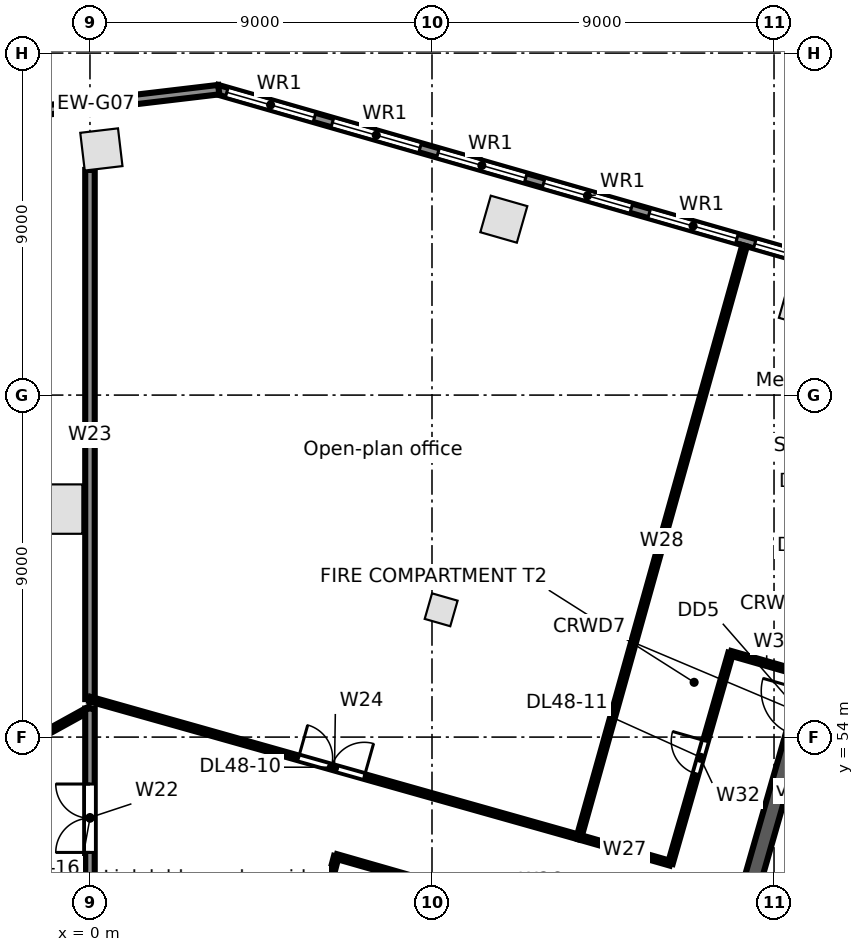
"""IFC4 building model, lengths in metres.
Left out: names, types, materials, properties, quantities, classifications, styles, units other than length and angle.
Written with IfcOpenShell. Run it as: python <this file> out.ifc"""

import sys

from ifc_helpers import new_model, si_unit, direction, frame, frame_2d, origin, origin_2d, place, context, subcontext, project, spatial, rectangle, extrude, element, fill, save


model = new_model("IFC4")
c1 = context("Model", 3, precision=1e-05, world=origin(), true_north=direction((0.0, 1.0)))
c2 = subcontext(c1, "Body", "Model", "MODEL_VIEW")
j1 = project(units=[si_unit("LENGTHUNIT", "METRE"), si_unit("PLANEANGLEUNIT", "RADIAN")], contexts=[c1])
p1 = place(None, origin())
s1 = spatial("IfcSite", under=j1, at=p1, CompositionType="ELEMENT")
p2 = place(p1, origin())
s2 = spatial("IfcBuilding", under=s1, at=p2, CompositionType="ELEMENT")
p3 = place(p2, frame((0.0, 0.0, 227.0)))
s3 = spatial("IfcBuildingStorey", under=s2, at=p3, CompositionType="ELEMENT", Elevation=227.0)
for number, where, z_axis, x_axis in (
    (1, (18.746, 65.376, 0.0), (0.0, 0.0, 1.0), (-0.961, 0.276, 0.0)),
    (2, (10.89, 67.629, 0.0), (0.0, 0.0, 1.0), (-0.961, 0.276, 0.0)),
    (3, (0.3, 69.464, 0.0), (0.0, 0.0, 1.0), (-0.993, -0.118, 0.0)),
):
    element("IfcColumn", number, at=place(p3, frame(where, z_axis=z_axis, x_axis=x_axis)), inside=s3, PredefinedType="COLUMN", context=c2, shape_type="SweptSolid", body=[
        extrude(rectangle(XDim=1.0, YDim=1.0, at=origin_2d()), origin(), (0.0, 0.0, 1.0), 3.9),
    ])
p4 = place(p3, frame((-0.85, 60.0, 0.0), z_axis=(0.0, 0.0, 1.0), x_axis=(0.0, 1.0, 0.0)))
e4 = element("IfcColumn", 4, at=p4, inside=s3, PredefinedType="COLUMN", context=c2, shape_type="SweptSolid", body=[
    extrude(rectangle(XDim=1.3, YDim=1.3, at=origin_2d()), origin(), (0.0, 0.0, 1.0), 3.9),
])
p5 = place(p3, frame((9.241, 57.35, 0.0), z_axis=(0.0, 0.0, 1.0), x_axis=(0.961261695938, -0.275637355817, 0.0)))
e5 = element("IfcColumn", 5, at=p5, inside=s3, PredefinedType="COLUMN", context=c2, shape_type="SweptSolid", body=[
    extrude(rectangle(XDim=0.7, YDim=0.7, at=origin_2d()), origin(), (0.0, 0.0, 1.0), 3.9),
])
p6 = place(p3, frame((3.34, 71.042, 0.0), z_axis=(0.0, 0.0, 1.0), x_axis=(0.96126179431, -0.275637012753, 0.0)))
e6 = element("IfcWall", 6, at=p6, inside=s3, PredefinedType="STANDARD", context=c2, shape_type="SweptSolid", body=[
    extrude(rectangle(XDim=34.779, YDim=0.25, at=frame_2d((17.39, 0.0))), origin(), (0.0, 0.0, 1.0), 3.55),
])
p7 = place(p6, frame((32.071, 0.0, 0.8)))
e7 = element("IfcOpeningElement", 7, at=p7, cuts=e6, PredefinedType="OPENING", context=c2, shape_type="SweptSolid", body=[
    extrude(rectangle(XDim=2.4, YDim=2.2, at=frame_2d((1.2, 1.1))), frame((0.0, 0.135, 0.0), z_axis=(0.0, -1.0, 0.0), x_axis=(1.0, 0.0, 0.0)), (0.0, 0.0, 1.0), 0.27),
])
p8 = place(p6, frame((29.18, 0.0, 0.8)))
e8 = element("IfcOpeningElement", 8, at=p8, cuts=e6, PredefinedType="OPENING", context=c2, shape_type="SweptSolid", body=[
    extrude(rectangle(XDim=2.4, YDim=2.2, at=frame_2d((1.2, 1.1))), frame((0.0, 0.135, 0.0), z_axis=(0.0, -1.0, 0.0), x_axis=(1.0, 0.0, 0.0)), (0.0, 0.0, 1.0), 0.27),
])
p9 = place(p6, frame((26.289, 0.0, 0.8)))
e9 = element("IfcOpeningElement", 9, at=p9, cuts=e6, PredefinedType="OPENING", context=c2, shape_type="SweptSolid", body=[
    extrude(rectangle(XDim=2.4, YDim=2.2, at=frame_2d((1.2, 1.1))), frame((0.0, 0.135, 0.0), z_axis=(0.0, -1.0, 0.0), x_axis=(1.0, 0.0, 0.0)), (0.0, 0.0, 1.0), 0.27),
])
p10 = place(p6, frame((23.398, 0.0, 0.8)))
e10 = element("IfcOpeningElement", 10, at=p10, cuts=e6, PredefinedType="OPENING", context=c2, shape_type="SweptSolid", body=[
    extrude(rectangle(XDim=2.4, YDim=2.2, at=frame_2d((1.2, 1.1))), frame((0.0, 0.135, 0.0), z_axis=(0.0, -1.0, 0.0), x_axis=(1.0, 0.0, 0.0)), (0.0, 0.0, 1.0), 0.27),
])
p11 = place(p6, frame((20.508, 0.0, 0.8)))
e11 = element("IfcOpeningElement", 11, at=p11, cuts=e6, PredefinedType="OPENING", context=c2, shape_type="SweptSolid", body=[
    extrude(rectangle(XDim=2.4, YDim=2.2, at=frame_2d((1.2, 1.1))), frame((0.0, 0.135, 0.0), z_axis=(0.0, -1.0, 0.0), x_axis=(1.0, 0.0, 0.0)), (0.0, 0.0, 1.0), 0.27),
])
p12 = place(p6, frame((17.616, 0.0, 0.8)))
e12 = element("IfcOpeningElement", 12, at=p12, cuts=e6, PredefinedType="OPENING", context=c2, shape_type="SweptSolid", body=[
    extrude(rectangle(XDim=2.4, YDim=2.2, at=frame_2d((1.2, 1.1))), frame((0.0, 0.135, 0.0), z_axis=(0.0, -1.0, 0.0), x_axis=(1.0, 0.0, 0.0)), (0.0, 0.0, 1.0), 0.27),
])
p13 = place(p6, frame((14.726, 0.0, 0.8)))
e13 = element("IfcOpeningElement", 13, at=p13, cuts=e6, PredefinedType="OPENING", context=c2, shape_type="SweptSolid", body=[
    extrude(rectangle(XDim=2.4, YDim=2.2, at=frame_2d((1.2, 1.1))), frame((0.0, 0.135, 0.0), z_axis=(0.0, -1.0, 0.0), x_axis=(1.0, 0.0, 0.0)), (0.0, 0.0, 1.0), 0.27),
])
p14 = place(p6, frame((11.834, 0.0, 0.8)))
e14 = element("IfcOpeningElement", 14, at=p14, cuts=e6, PredefinedType="OPENING", context=c2, shape_type="SweptSolid", body=[
    extrude(rectangle(XDim=2.4, YDim=2.2, at=frame_2d((1.2, 1.1))), frame((0.0, 0.135, 0.0), z_axis=(0.0, -1.0, 0.0), x_axis=(1.0, 0.0, 0.0)), (0.0, 0.0, 1.0), 0.27),
])
p15 = place(p6, frame((8.944, 0.0, 0.8)))
e15 = element("IfcOpeningElement", 15, at=p15, cuts=e6, PredefinedType="OPENING", context=c2, shape_type="SweptSolid", body=[
    extrude(rectangle(XDim=2.4, YDim=2.2, at=frame_2d((1.2, 1.1))), frame((0.0, 0.135, 0.0), z_axis=(0.0, -1.0, 0.0), x_axis=(1.0, 0.0, 0.0)), (0.0, 0.0, 1.0), 0.27),
])
p16 = place(p6, frame((6.052, 0.0, 0.8)))
e16 = element("IfcOpeningElement", 16, at=p16, cuts=e6, PredefinedType="OPENING", context=c2, shape_type="SweptSolid", body=[
    extrude(rectangle(XDim=2.4, YDim=2.2, at=frame_2d((1.2, 1.1))), frame((0.0, 0.135, 0.0), z_axis=(0.0, -1.0, 0.0), x_axis=(1.0, 0.0, 0.0)), (0.0, 0.0, 1.0), 0.27),
])
p17 = place(p6, frame((3.162, 0.0, 0.8)))
e17 = element("IfcOpeningElement", 17, at=p17, cuts=e6, PredefinedType="OPENING", context=c2, shape_type="SweptSolid", body=[
    extrude(rectangle(XDim=2.4, YDim=2.2, at=frame_2d((1.2, 1.1))), frame((0.0, 0.135, 0.0), z_axis=(0.0, -1.0, 0.0), x_axis=(1.0, 0.0, 0.0)), (0.0, 0.0, 1.0), 0.27),
])
p18 = place(p6, frame((0.271, 0.0, 0.8)))
e18 = element("IfcOpeningElement", 18, at=p18, cuts=e6, PredefinedType="OPENING", context=c2, shape_type="SweptSolid", body=[
    extrude(rectangle(XDim=2.4, YDim=2.2, at=frame_2d((1.2, 1.1))), frame((0.0, 0.135, 0.0), z_axis=(0.0, -1.0, 0.0), x_axis=(1.0, 0.0, 0.0)), (0.0, 0.0, 1.0), 0.27),
])
p19 = place(p3, frame((-3.071, 70.273, 0.0), z_axis=(0.0, 0.0, 1.0), x_axis=(0.993064524962, 0.11757061394, 0.0)))
e19 = element("IfcWall", 19, at=p19, inside=s3, PredefinedType="STANDARD", context=c2, shape_type="SweptSolid", body=[
    extrude(rectangle(XDim=6.506, YDim=0.25, at=frame_2d((3.253, 0.0))), origin(), (0.0, 0.0, 1.0), 3.55),
])
p20 = place(p3, frame((17.168, 49.303, 0.0), z_axis=(0.0, 0.0, 1.0), x_axis=(0.275638974822, 0.961261231695, 0.0)))
e20 = element("IfcWall", 20, at=p20, inside=s3, PredefinedType="SOLIDWALL", context=c2, shape_type="SweptSolid", body=[
    extrude(rectangle(XDim=11.1, YDim=0.45, at=frame_2d((5.55, 0.0))), origin(), (0.0, 0.0, 1.0), 3.55),
])
p21 = place(p20, frame((4.95, 0.0, 0.0)))
e21 = element("IfcOpeningElement", 21, at=p21, cuts=e20, PredefinedType="OPENING", context=c2, shape_type="SweptSolid", body=[
    extrude(rectangle(XDim=1.2, YDim=2.1, at=frame_2d((0.6, 1.05))), frame((0.0, 0.235, 0.0), z_axis=(0.0, -1.0, 0.0), x_axis=(1.0, 0.0, 0.0)), (0.0, 0.0, 1.0), 0.47),
])
p22 = place(p3, frame((-6.053, 51.405, 0.0), z_axis=(0.0, 0.0, 1.0), x_axis=(0.875247434681, 0.483675436718, 0.0)))
e22 = element("IfcWall", 22, at=p22, inside=s3, PredefinedType="PARTITIONING", context=c2, shape_type="SweptSolid", body=[
    extrude(rectangle(XDim=6.916, YDim=0.125, at=frame_2d((3.458, 0.0))), origin(), (0.0, 0.0, 1.0), 2.618),
])
p23 = place(p22, frame((2.45, 0.0, 0.0)))
e23 = element("IfcOpeningElement", 23, at=p23, cuts=e22, PredefinedType="OPENING", context=c2, shape_type="SweptSolid", body=[
    extrude(rectangle(XDim=1.8, YDim=2.1, at=frame_2d((0.9, 1.05))), frame((0.0, 0.073, 0.0), z_axis=(0.0, -1.0, 0.0), x_axis=(1.0, 0.0, 0.0)), (0.0, 0.0, 1.0), 0.145),
])
p24 = place(p3, frame((0.0, 49.015, 0.0), z_axis=(0.0, 0.0, 1.0), x_axis=(0.0, 1.0, 0.0)))
e24 = element("IfcWall", 24, at=p24, inside=s3, PredefinedType="PARTITIONING", context=c2, shape_type="SweptSolid", body=[
    extrude(rectangle(XDim=5.735, YDim=0.25, at=frame_2d((2.868, 0.0))), origin(), (0.0, 0.0, 1.0), 3.55),
])
p25 = place(p24, frame((1.95, 0.0, 0.0)))
e25 = element("IfcOpeningElement", 25, at=p25, cuts=e24, PredefinedType="OPENING", context=c2, shape_type="SweptSolid", body=[
    extrude(rectangle(XDim=1.8, YDim=2.1, at=frame_2d((0.9, 1.05))), frame((0.0, 0.135, 0.0), z_axis=(0.0, -1.0, 0.0), x_axis=(1.0, 0.0, 0.0)), (0.0, 0.0, 1.0), 0.27),
])
p26 = place(p3, frame((0.0, 55.0, 0.0), z_axis=(0.0, 0.0, 1.0), x_axis=(0.0, 1.0, 0.0)))
e26 = element("IfcWall", 26, at=p26, inside=s3, PredefinedType="PARTITIONING", context=c2, shape_type="SweptSolid", body=[
    extrude(rectangle(XDim=13.925, YDim=0.25, at=frame_2d((6.962, 0.0))), origin(), (0.0, 0.0, 1.0), 2.618),
])
p27 = place(p3, frame((0.0, 55.0, 0.0), z_axis=(0.0, 0.0, 1.0), x_axis=(0.962402937884, -0.271625818271, 0.0)))
e27 = element("IfcWall", 27, at=p27, inside=s3, PredefinedType="PARTITIONING", context=c2, shape_type="SweptSolid", body=[
    extrude(rectangle(XDim=13.372, YDim=0.125, at=frame_2d((6.686, 0.0))), origin(), (0.0, 0.0, 1.0), 2.618),
])
p28 = place(p27, frame((5.7, 0.0, 0.0)))
e28 = element("IfcOpeningElement", 28, at=p28, cuts=e27, PredefinedType="OPENING", context=c2, shape_type="SweptSolid", body=[
    extrude(rectangle(XDim=1.8, YDim=2.1, at=frame_2d((0.9, 1.05))), frame((0.0, 0.073, 0.0), z_axis=(0.0, -1.0, 0.0), x_axis=(1.0, 0.0, 0.0)), (0.0, 0.0, 1.0), 0.145),
])
p29 = place(p3, frame((5.364, 46.592, 0.0), z_axis=(0.0, 0.0, 1.0), x_axis=(0.253446952203, 0.967349286669, 0.0)))
e29 = element("IfcWall", 29, at=p29, inside=s3, PredefinedType="PARTITIONING", context=c2, shape_type="SweptSolid", body=[
    extrude(rectangle(XDim=4.411, YDim=0.125, at=frame_2d((2.206, 0.0))), origin(), (0.0, 0.0, 1.0), 2.83),
])
p30 = place(p3, frame((6.482, 50.859, 0.0), z_axis=(0.0, 0.0, 1.0), x_axis=(0.961261196169, -0.275639098713, 0.0)))
e30 = element("IfcWall", 30, at=p30, inside=s3, PredefinedType="PARTITIONING", context=c2, shape_type="SweptSolid", body=[
    extrude(rectangle(XDim=8.5, YDim=0.125, at=frame_2d((4.25, 0.0))), origin(), (0.0, 0.0, 1.0), 2.618),
])
p31 = place(p30, frame((3.7, 0.0, 0.0)))
e31 = element("IfcOpeningElement", 31, at=p31, cuts=e30, PredefinedType="OPENING", context=c2, shape_type="SweptSolid", body=[
    extrude(rectangle(XDim=0.9, YDim=2.1, at=frame_2d((0.45, 1.05))), frame((0.0, 0.073, 0.0), z_axis=(0.0, -1.0, 0.0), x_axis=(1.0, 0.0, 0.0)), (0.0, 0.0, 1.0), 0.145),
])
p32 = place(p3, frame((12.869, 51.368, 0.0), z_axis=(0.0, 0.0, 1.0), x_axis=(0.961302601161, -0.275494662382, 0.0)))
e32 = element("IfcWall", 32, at=p32, inside=s3, PredefinedType="PARTITIONING", context=c2, shape_type="SweptSolid", body=[
    extrude(rectangle(XDim=2.501, YDim=0.125, at=frame_2d((1.25, 0.0))), origin(), (0.0, 0.0, 1.0), 3.55),
])
p33 = place(p3, frame((12.869, 51.368, 0.0), z_axis=(0.0, 0.0, 1.0), x_axis=(0.269547555311, 0.962987079574, 0.0)))
e33 = element("IfcWall", 33, at=p33, inside=s3, PredefinedType="PARTITIONING", context=c2, shape_type="SweptSolid", body=[
    extrude(rectangle(XDim=16.161, YDim=0.125, at=frame_2d((8.081, 0.0))), origin(), (0.0, 0.0, 1.0), 2.618),
])
p34 = place(p3, frame((15.273, 50.679, 0.0), z_axis=(0.0, 0.0, 1.0), x_axis=(0.275494973205, 0.961302512084, 0.0)))
e34 = element("IfcWall", 34, at=p34, inside=s3, PredefinedType="PARTITIONING", context=c2, shape_type="SweptSolid", body=[
    extrude(rectangle(XDim=5.75, YDim=0.125, at=frame_2d((2.875, 0.0))), origin(), (0.0, 0.0, 1.0), 2.618),
])
p35 = place(p34, frame((2.45, 0.0, 0.0)))
e35 = element("IfcOpeningElement", 35, at=p35, cuts=e34, PredefinedType="OPENING", context=c2, shape_type="SweptSolid", body=[
    extrude(rectangle(XDim=0.9, YDim=2.1, at=frame_2d((0.45, 1.05))), frame((0.0, 0.073, 0.0), z_axis=(0.0, -1.0, 0.0), x_axis=(1.0, 0.0, 0.0)), (0.0, 0.0, 1.0), 0.145),
])
p36 = place(p3, frame((16.857, 56.206, 0.0), z_axis=(0.0, 0.0, 1.0), x_axis=(0.961383985066, -0.275210525341, 0.0)))
e36 = element("IfcWall", 36, at=p36, inside=s3, PredefinedType="PARTITIONING", context=c2, shape_type="SweptSolid", body=[
    extrude(rectangle(XDim=1.977, YDim=0.125, at=frame_2d((0.988, 0.0))), origin(), (0.0, 0.0, 1.0), 3.55),
])
p37 = place(p13, origin())
e37 = element("IfcWindow", 37, at=p37, inside=s3, PartitioningType="SINGLE_PANEL", PredefinedType="WINDOW", context=c2, shape_type="SweptSolid", body=[
    extrude(rectangle(XDim=2.4, YDim=2.2, at=frame_2d((1.2, 1.1))), frame((0.0, 0.03, 0.0), z_axis=(0.0, -1.0, 0.0), x_axis=(1.0, 0.0, 0.0)), (0.0, 0.0, 1.0), 0.06),
])
fill(e13, e37)
p38 = place(p14, origin())
e38 = element("IfcWindow", 38, at=p38, inside=s3, PartitioningType="SINGLE_PANEL", PredefinedType="WINDOW", context=c2, shape_type="SweptSolid", body=[
    extrude(rectangle(XDim=2.4, YDim=2.2, at=frame_2d((1.2, 1.1))), frame((0.0, 0.03, 0.0), z_axis=(0.0, -1.0, 0.0), x_axis=(1.0, 0.0, 0.0)), (0.0, 0.0, 1.0), 0.06),
])
fill(e14, e38)
p39 = place(p15, origin())
e39 = element("IfcWindow", 39, at=p39, inside=s3, PartitioningType="SINGLE_PANEL", PredefinedType="WINDOW", context=c2, shape_type="SweptSolid", body=[
    extrude(rectangle(XDim=2.4, YDim=2.2, at=frame_2d((1.2, 1.1))), frame((0.0, 0.03, 0.0), z_axis=(0.0, -1.0, 0.0), x_axis=(1.0, 0.0, 0.0)), (0.0, 0.0, 1.0), 0.06),
])
fill(e15, e39)
p40 = place(p16, origin())
e40 = element("IfcWindow", 40, at=p40, inside=s3, PartitioningType="SINGLE_PANEL", PredefinedType="WINDOW", context=c2, shape_type="SweptSolid", body=[
    extrude(rectangle(XDim=2.4, YDim=2.2, at=frame_2d((1.2, 1.1))), frame((0.0, 0.03, 0.0), z_axis=(0.0, -1.0, 0.0), x_axis=(1.0, 0.0, 0.0)), (0.0, 0.0, 1.0), 0.06),
])
fill(e16, e40)
p41 = place(p17, origin())
e41 = element("IfcWindow", 41, at=p41, inside=s3, PartitioningType="SINGLE_PANEL", PredefinedType="WINDOW", context=c2, shape_type="SweptSolid", body=[
    extrude(rectangle(XDim=2.4, YDim=2.2, at=frame_2d((1.2, 1.1))), frame((0.0, 0.03, 0.0), z_axis=(0.0, -1.0, 0.0), x_axis=(1.0, 0.0, 0.0)), (0.0, 0.0, 1.0), 0.06),
])
fill(e17, e41)
p42 = place(p18, origin())
e42 = element("IfcWindow", 42, at=p42, inside=s3, PartitioningType="SINGLE_PANEL", PredefinedType="WINDOW", context=c2, shape_type="SweptSolid", body=[
    extrude(rectangle(XDim=2.4, YDim=2.2, at=frame_2d((1.2, 1.1))), frame((0.0, 0.03, 0.0), z_axis=(0.0, -1.0, 0.0), x_axis=(1.0, 0.0, 0.0)), (0.0, 0.0, 1.0), 0.06),
])
fill(e18, e42)
p43 = place(p28, origin())
e43 = element("IfcDoor", 43, at=p43, inside=s3, OperationType="DOUBLE_DOOR_SINGLE_SWING", PredefinedType="DOOR", context=c2, shape_type="SweptSolid", body=[
    extrude(rectangle(XDim=1.8, YDim=2.1, at=frame_2d((0.9, 1.05))), frame((0.0, 0.025, 0.0), z_axis=(0.0, -1.0, 0.0), x_axis=(1.0, 0.0, 0.0)), (0.0, 0.0, 1.0), 0.05),
])
fill(e28, e43)
p44 = place(p35, origin())
e44 = element("IfcDoor", 44, at=p44, inside=s3, OperationType="SINGLE_SWING_RIGHT", PredefinedType="DOOR", context=c2, shape_type="SweptSolid", body=[
    extrude(rectangle(XDim=0.9, YDim=2.1, at=frame_2d((0.45, 1.05))), frame((0.0, 0.025, 0.0), z_axis=(0.0, -1.0, 0.0), x_axis=(1.0, 0.0, 0.0)), (0.0, 0.0, 1.0), 0.05),
])
fill(e35, e44)
p45 = place(p25, origin())
e45 = element("IfcDoor", 45, at=p45, inside=s3, OperationType="DOUBLE_DOOR_SINGLE_SWING", PredefinedType="DOOR", context=c2, shape_type="SweptSolid", body=[
    extrude(rectangle(XDim=1.8, YDim=2.1, at=frame_2d((0.9, 1.05))), frame((0.0, 0.025, 0.0), z_axis=(0.0, -1.0, 0.0), x_axis=(1.0, 0.0, 0.0)), (0.0, 0.0, 1.0), 0.05),
])
fill(e25, e45)
save(model, sys.argv[1])
